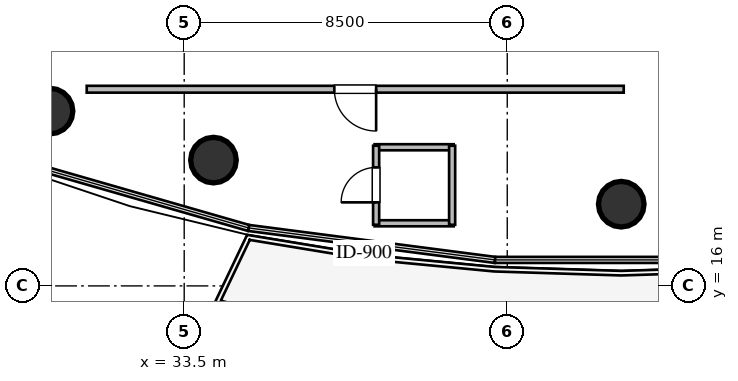
"""IFC4 building model, lengths in metres.
Left out: names, types, materials, properties, quantities, classifications, styles, units other than length and angle.
Written with IfcOpenShell. Run it as: python <this file> out.ifc"""

import sys

from ifc_helpers import new_model, si_unit, direction, frame, frame_2d, origin, origin_2d, place, context, subcontext, project, spatial, rectangle, circle, extrude, element, fill, save


model = new_model("IFC4")
c1 = context("Model", 3, precision=1e-05, world=origin(), true_north=direction((0.0, 1.0)))
c2 = subcontext(c1, "Body", "Model", "MODEL_VIEW")
j1 = project(units=[si_unit("LENGTHUNIT", "METRE"), si_unit("PLANEANGLEUNIT", "RADIAN")], contexts=[c1])
p1 = place(None, origin())
s1 = spatial("IfcSite", under=j1, at=p1, CompositionType="ELEMENT")
p2 = place(p1, origin())
s2 = spatial("IfcBuilding", under=s1, at=p2, CompositionType="ELEMENT")
p3 = place(p2, frame((0.0, 0.0, 138.6)))
s3 = spatial("IfcBuildingStorey", under=s2, at=p3, CompositionType="ELEMENT", Elevation=138.6)
for number, where, z_axis, x_axis in (
    (1, (29.97, 20.6, 0.0), (0.0, 0.0, 1.0), (1.0, 0.0, 0.0)),
    (2, (34.27, 19.31, 0.0), (0.0, 0.0, 1.0), (1.0, 0.0, 0.0)),
    (3, (45.0, 18.15, 0.0), (0.0, 0.0, 1.0), (1.0, 0.0, 0.0)),
):
    element("IfcColumn", number, at=place(p3, frame(where, z_axis=z_axis, x_axis=x_axis)), inside=s3, PredefinedType="COLUMN", context=c2, shape_type="SweptSolid", body=[
        extrude(circle(Radius=0.6, at=origin_2d()), origin(), (0.0, 0.0, 1.0), 3.6),
    ])
for number, where, z_axis, x_axis in (
    (4, (38.51, 17.648, 0.0), (0.0, 0.0, 1.0), (1.0, 0.0, 0.0)),
    (5, (38.51, 19.648, 0.0), (0.0, 0.0, 1.0), (1.0, 0.0, 0.0)),
):
    element("IfcWall", number, at=place(p3, frame(where, z_axis=z_axis, x_axis=x_axis)), inside=s3, PredefinedType="PLUMBINGWALL", context=c2, shape_type="SweptSolid", body=[
        extrude(rectangle(XDim=2.08, YDim=0.16, at=frame_2d((1.04, 0.0))), origin(), (0.0, 0.0, 1.0), 3.36),
    ])
p4 = place(p3, frame((38.55, 17.608, 0.0), z_axis=(0.0, 0.0, 1.0), x_axis=(0.0, 1.0, 0.0)))
e6 = element("IfcWall", 6, at=p4, inside=s3, PredefinedType="PLUMBINGWALL", context=c2, shape_type="SweptSolid", body=[
    extrude(rectangle(XDim=2.08, YDim=0.16, at=frame_2d((1.04, 0.0))), origin(), (0.0, 0.0, 1.0), 3.36),
])
p5 = place(p4, frame((0.59, 0.0, 0.0)))
e7 = element("IfcOpeningElement", 7, at=p5, cuts=e6, PredefinedType="OPENING", context=c2, shape_type="SweptSolid", body=[
    extrude(rectangle(XDim=0.92, YDim=2.1, at=frame_2d((0.46, 1.05))), frame((0.0, 0.09, 0.0), z_axis=(0.0, -1.0, 0.0), x_axis=(1.0, 0.0, 0.0)), (0.0, 0.0, 1.0), 0.18),
])
p6 = place(p3, frame((40.55, 17.608, 0.0), z_axis=(0.0, 0.0, 1.0), x_axis=(0.0, 1.0, 0.0)))
e8 = element("IfcWall", 8, at=p6, inside=s3, PredefinedType="PLUMBINGWALL", context=c2, shape_type="SweptSolid", body=[
    extrude(rectangle(XDim=2.08, YDim=0.16, at=frame_2d((1.04, 0.0))), origin(), (0.0, 0.0, 1.0), 3.36),
])
p7 = place(p3, frame((45.065, 21.175, 0.0), z_axis=(0.0, 0.0, 1.0), x_axis=(-1.0, 0.0, 0.0)))
e9 = element("IfcWall", 9, at=p7, inside=s3, PredefinedType="PARTITIONING", context=c2, shape_type="SweptSolid", body=[
    extrude(rectangle(XDim=14.13, YDim=0.18, at=frame_2d((7.065, 0.0))), origin(), (0.0, 0.0, 1.0), 2.996),
])
p8 = place(p7, frame((6.515, 0.0, 0.0)))
e10 = element("IfcOpeningElement", 10, at=p8, cuts=e9, PredefinedType="OPENING", context=c2, shape_type="SweptSolid", body=[
    extrude(rectangle(XDim=1.1, YDim=2.1, at=frame_2d((0.55, 1.05))), frame((0.0, 0.1, 0.0), z_axis=(0.0, -1.0, 0.0), x_axis=(1.0, 0.0, 0.0)), (0.0, 0.0, 1.0), 0.2),
])
p9 = place(p5, origin())
e11 = element("IfcDoor", 11, at=p9, inside=s3, OperationType="SINGLE_SWING_LEFT", PredefinedType="DOOR", context=c2, shape_type="SweptSolid", body=[
    extrude(rectangle(XDim=0.92, YDim=2.1, at=frame_2d((0.46, 1.05))), frame((0.0, 0.025, 0.0), z_axis=(0.0, -1.0, 0.0), x_axis=(1.0, 0.0, 0.0)), (0.0, 0.0, 1.0), 0.05),
])
fill(e7, e11)
p10 = place(p8, origin())
e12 = element("IfcDoor", 12, at=p10, inside=s3, OperationType="SINGLE_SWING_LEFT", PredefinedType="DOOR", context=c2, shape_type="SweptSolid", body=[
    extrude(rectangle(XDim=1.1, YDim=2.1, at=frame_2d((0.55, 1.05))), frame((0.0, 0.025, 0.0), z_axis=(0.0, -1.0, 0.0), x_axis=(1.0, 0.0, 0.0)), (0.0, 0.0, 1.0), 0.05),
])
fill(e10, e12)
save(model, sys.argv[1])
